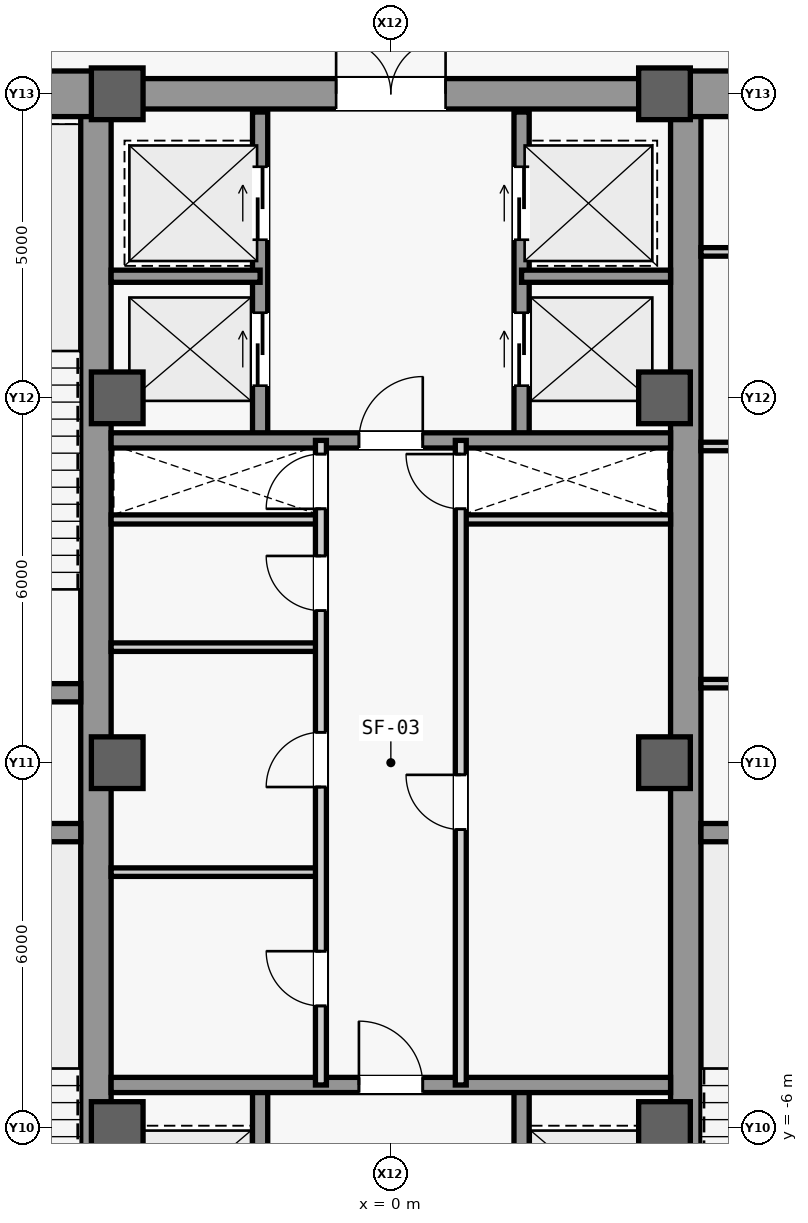
"""IFC4 building model, lengths in metres.
Left out: names, types, materials, properties, quantities, classifications, styles, units other than length and angle.
Written with IfcOpenShell. Run it as: python <this file> out.ifc"""

import sys

from ifc_helpers import new_model, si_unit, direction, frame, frame_2d, origin, origin_2d, place, context, subcontext, project, spatial, rectangle, extrude, source, transform, mapped, element, fill, save


model = new_model("IFC4")
c1 = context("Model", 3, precision=1e-05, world=origin(), true_north=direction((0.0, 1.0)))
c2 = subcontext(c1, "Body", "Model", "MODEL_VIEW")
j1 = project(units=[si_unit("LENGTHUNIT", "METRE"), si_unit("PLANEANGLEUNIT", "RADIAN")], contexts=[c1])
p1 = place(None, origin())
s1 = spatial("IfcSite", under=j1, at=p1, CompositionType="ELEMENT")
p2 = place(p1, origin())
s2 = spatial("IfcBuilding", under=s1, at=p2, CompositionType="ELEMENT")
p3 = place(p2, frame((0.0, 0.0, 144.7)))
s3 = spatial("IfcBuildingStorey", under=s2, at=p3, CompositionType="ELEMENT", Elevation=144.7)
m1 = source(origin(), c2, "Body", "SweptSolid", [
    extrude(rectangle(XDim=21.4, YDim=0.5, at=frame_2d((10.7, 0.0))), origin(), (0.0, 0.0, 1.0), 4.6),
])
for number, where, z_axis, x_axis in (
    (1, (-4.85, -10.7, 0.0), (0.0, 0.0, 1.0), (0.0, 1.0, 0.0)),
    (2, (4.85, -10.7, 0.0), (0.0, 0.0, 1.0), (0.0, 1.0, 0.0)),
):
    element("IfcWall", number, at=place(p3, frame(where, z_axis=z_axis, x_axis=x_axis)), inside=s3, PredefinedType="SHEAR", context=c2, shape_type="MappedRepresentation", body=[
        mapped(m1, transform((0.0, 0.0, 0.0), scale=1.0)),
    ])
m2 = source(origin(), c2, "Body", "SweptSolid", [
    extrude(rectangle(XDim=5.85, YDim=0.75, at=frame_2d((2.925, 0.0))), origin(), (0.0, 0.0, 1.0), 4.6),
])
p4 = place(p3, frame((-10.7, 11.0, 0.0), z_axis=(0.0, 0.0, 1.0), x_axis=(1.0, 0.0, 0.0)))
e3 = element("IfcWall", 3, at=p4, inside=s3, PredefinedType="SHEAR", context=c2, shape_type="MappedRepresentation", body=[
    mapped(m2, transform((0.0, 0.0, 0.0), scale=1.0)),
])
p5 = place(p3, frame((4.85, 11.0, 0.0), z_axis=(0.0, 0.0, 1.0), x_axis=(1.0, 0.0, 0.0)))
e4 = element("IfcWall", 4, at=p5, inside=s3, PredefinedType="SHEAR", context=c2, shape_type="MappedRepresentation", body=[
    mapped(m2, transform((0.0, 0.0, 0.0), scale=1.0)),
])
m3 = source(origin(), c2, "Body", "SweptSolid", [
    extrude(rectangle(XDim=1.05, YDim=2.2, at=frame_2d((0.525, 1.1))), frame((0.0, 0.385, 0.0), z_axis=(0.0, -1.0, 0.0), x_axis=(1.0, 0.0, 0.0)), (0.0, 0.0, 1.0), 0.77),
])
p6 = place(p5, frame((1.375, 0.0, 0.0)))
e5 = element("IfcOpeningElement", 5, at=p6, cuts=e4, PredefinedType="OPENING", context=c2, shape_type="MappedRepresentation", body=[
    mapped(m3, transform((0.0, 0.0, 0.0), scale=1.0)),
])
m4 = source(origin(), c2, "Body", "SweptSolid", [
    extrude(rectangle(XDim=5.6, YDim=0.3, at=frame_2d((2.8, 0.0))), origin(), (0.0, 0.0, 1.0), 4.6),
])
for number, where, z_axis, x_axis in (
    (6, (-10.7, -1.15, 0.0), (0.0, 0.0, 1.0), (1.0, 0.0, 0.0)),
    (7, (-10.7, 1.15, 0.0), (0.0, 0.0, 1.0), (1.0, 0.0, 0.0)),
    (8, (5.1, -1.15, 0.0), (0.0, 0.0, 1.0), (1.0, 0.0, 0.0)),
):
    element("IfcWall", number, at=place(p3, frame(where, z_axis=z_axis, x_axis=x_axis)), inside=s3, PredefinedType="SHEAR", context=c2, shape_type="MappedRepresentation", body=[
        mapped(m4, transform((0.0, 0.0, 0.0), scale=1.0)),
    ])
m5 = source(origin(), c2, "Body", "SweptSolid", [
    extrude(rectangle(XDim=9.2, YDim=0.5, at=frame_2d((4.6, 0.0))), origin(), (0.0, 0.0, 1.0), 4.6),
])
p7 = place(p3, frame((-4.6, 11.0, 0.0), z_axis=(0.0, 0.0, 1.0), x_axis=(1.0, 0.0, 0.0)))
e9 = element("IfcWall", 9, at=p7, inside=s3, PredefinedType="SHEAR", context=c2, shape_type="MappedRepresentation", body=[
    mapped(m5, transform((0.0, 0.0, 0.0), scale=1.0)),
])
m6 = source(origin(), c2, "Body", "SweptSolid", [
    extrude(rectangle(XDim=1.8, YDim=2.25, at=frame_2d((0.9, 1.125))), frame((0.0, 0.26, 0.0), z_axis=(0.0, -1.0, 0.0), x_axis=(1.0, 0.0, 0.0)), (0.0, 0.0, 1.0), 0.52),
])
p8 = place(p7, frame((3.7, 0.0, 0.0)))
e10 = element("IfcOpeningElement", 10, at=p8, cuts=e9, PredefinedType="OPENING", context=c2, shape_type="MappedRepresentation", body=[
    mapped(m6, transform((0.0, 0.0, 0.0), scale=1.0)),
])
m7 = source(origin(), c2, "Body", "SweptSolid", [
    extrude(rectangle(XDim=0.85, YDim=0.85, at=origin_2d()), origin(), (0.0, 0.0, 1.0), 5.2),
])
for number, where, z_axis, x_axis in (
    (11, (-4.5, -6.0, 0.0), (0.0, 0.0, 1.0), (1.0, 0.0, 0.0)),
    (12, (-4.5, 0.0, 0.0), (0.0, 0.0, 1.0), (1.0, 0.0, 0.0)),
    (13, (-4.5, 6.0, 0.0), (0.0, 0.0, 1.0), (1.0, 0.0, 0.0)),
    (14, (-4.5, 11.0, 0.0), (0.0, 0.0, 1.0), (1.0, 0.0, 0.0)),
    (15, (4.5, -6.0, 0.0), (0.0, 0.0, 1.0), (1.0, 0.0, 0.0)),
    (16, (4.5, 0.0, 0.0), (0.0, 0.0, 1.0), (1.0, 0.0, 0.0)),
    (17, (4.5, 6.0, 0.0), (0.0, 0.0, 1.0), (1.0, 0.0, 0.0)),
    (18, (4.5, 11.0, 0.0), (0.0, 0.0, 1.0), (1.0, 0.0, 0.0)),
):
    element("IfcColumn", number, at=place(p3, frame(where, z_axis=z_axis, x_axis=x_axis)), inside=s3, PredefinedType="COLUMN", context=c2, shape_type="MappedRepresentation", body=[
        mapped(m7, transform((0.0, 0.0, 0.0), scale=1.0)),
    ])
m8 = source(origin(), c2, "Body", "SweptSolid", [
    extrude(rectangle(XDim=3.15, YDim=0.14, at=frame_2d((1.575, 0.0))), origin(), (0.0, 0.0, 1.0), 4.6),
])
p9 = place(p3, frame((5.1, 1.3, 0.0), z_axis=(0.0, 0.0, 1.0), x_axis=(1.0, 0.0, 0.0)))
e19 = element("IfcWall", 19, at=p9, inside=s3, PredefinedType="PARTITIONING", context=c2, shape_type="MappedRepresentation", body=[
    mapped(m8, transform((0.0, 0.0, 0.0), scale=1.0)),
])
p10 = place(p3, frame((5.1, 8.4, 0.0), z_axis=(0.0, 0.0, 1.0), x_axis=(1.0, 0.0, 0.0)))
e20 = element("IfcWall", 20, at=p10, inside=s3, PredefinedType="PARTITIONING", context=c2, shape_type="MappedRepresentation", body=[
    mapped(m8, transform((0.0, 0.0, 0.0), scale=1.0)),
])
m9 = source(origin(), c2, "Body", "SweptSolid", [
    extrude(rectangle(XDim=0.9, YDim=2.15, at=frame_2d((0.45, 1.075))), frame((0.0, 0.08, 0.0), z_axis=(0.0, -1.0, 0.0), x_axis=(1.0, 0.0, 0.0)), (0.0, 0.0, 1.0), 0.16),
])
p11 = place(p10, frame((1.13, 0.0, 0.0)))
e21 = element("IfcOpeningElement", 21, at=p11, cuts=e20, PredefinedType="OPENING", context=c2, shape_type="MappedRepresentation", body=[
    mapped(m9, transform((0.0, 0.0, 0.0), scale=1.0)),
])
p12 = place(p3, frame((5.1, 5.2, 0.0), z_axis=(0.0, 0.0, 1.0), x_axis=(1.0, 0.0, 0.0)))
e22 = element("IfcWall", 22, at=p12, inside=s3, PredefinedType="PARTITIONING", context=c2, shape_type="MappedRepresentation", body=[
    mapped(m8, transform((0.0, 0.0, 0.0), scale=1.0)),
])
p13 = place(p12, frame((1.13, 0.0, 0.0)))
e23 = element("IfcOpeningElement", 23, at=p13, cuts=e22, PredefinedType="OPENING", context=c2, shape_type="MappedRepresentation", body=[
    mapped(m9, transform((0.0, 0.0, 0.0), scale=1.0)),
])
m10 = source(origin(), c2, "Body", "SweptSolid", [
    extrude(rectangle(XDim=3.45, YDim=0.15, at=frame_2d((1.725, 0.0))), origin(), (0.0, 0.0, 1.0), 4.6),
])
for number, where, z_axis, x_axis in (
    (24, (-4.6, 4.0, 0.0), (0.0, 0.0, 1.0), (1.0, 0.0, 0.0)),
    (25, (1.15, 4.0, 0.0), (0.0, 0.0, 1.0), (1.0, 0.0, 0.0)),
):
    element("IfcWall", number, at=place(p3, frame(where, z_axis=z_axis, x_axis=x_axis)), inside=s3, PredefinedType="PARTITIONING", context=c2, shape_type="MappedRepresentation", body=[
        mapped(m10, transform((0.0, 0.0, 0.0), scale=1.0)),
    ])
m11 = source(origin(), c2, "Body", "SweptSolid", [
    extrude(rectangle(XDim=5.4, YDim=0.25, at=frame_2d((2.7, 0.0))), origin(), (0.0, 0.0, 1.0), 4.6),
])
p14 = place(p3, frame((-2.15, -10.7, 0.0), z_axis=(0.0, 0.0, 1.0), x_axis=(0.0, 1.0, 0.0)))
e26 = element("IfcWall", 26, at=p14, inside=s3, PredefinedType="SHEAR", context=c2, shape_type="MappedRepresentation", body=[
    mapped(m11, transform((0.0, 0.0, 0.0), scale=1.0)),
])
m12 = source(origin(), c2, "Body", "SweptSolid", [
    extrude(rectangle(XDim=1.2, YDim=2.3, at=frame_2d((0.6, 1.15))), frame((0.0, 0.135, 0.0), z_axis=(0.0, -1.0, 0.0), x_axis=(1.0, 0.0, 0.0)), (0.0, 0.0, 1.0), 0.27),
])
p15 = place(p14, frame((0.9, 0.0, 0.0)))
e27 = element("IfcOpeningElement", 27, at=p15, cuts=e26, PredefinedType="OPENING", context=c2, shape_type="MappedRepresentation", body=[
    mapped(m12, transform((0.0, 0.0, 0.0), scale=1.0)),
])
p16 = place(p14, frame((3.2, 0.0, 0.0)))
e28 = element("IfcOpeningElement", 28, at=p16, cuts=e26, PredefinedType="OPENING", context=c2, shape_type="MappedRepresentation", body=[
    mapped(m12, transform((0.0, 0.0, 0.0), scale=1.0)),
])
p17 = place(p3, frame((2.15, -10.7, 0.0), z_axis=(0.0, 0.0, 1.0), x_axis=(0.0, 1.0, 0.0)))
e29 = element("IfcWall", 29, at=p17, inside=s3, PredefinedType="SHEAR", context=c2, shape_type="MappedRepresentation", body=[
    mapped(m11, transform((0.0, 0.0, 0.0), scale=1.0)),
])
p18 = place(p17, frame((0.9, 0.0, 0.0)))
e30 = element("IfcOpeningElement", 30, at=p18, cuts=e29, PredefinedType="OPENING", context=c2, shape_type="MappedRepresentation", body=[
    mapped(m12, transform((0.0, 0.0, 0.0), scale=1.0)),
])
p19 = place(p17, frame((3.2, 0.0, 0.0)))
e31 = element("IfcOpeningElement", 31, at=p19, cuts=e29, PredefinedType="OPENING", context=c2, shape_type="MappedRepresentation", body=[
    mapped(m12, transform((0.0, 0.0, 0.0), scale=1.0)),
])
m13 = source(origin(), c2, "Body", "SweptSolid", [
    extrude(rectangle(XDim=9.2, YDim=0.25, at=frame_2d((4.6, 0.0))), origin(), (0.0, 0.0, 1.0), 4.6),
])
p20 = place(p3, frame((-4.6, -5.3, 0.0), z_axis=(0.0, 0.0, 1.0), x_axis=(1.0, 0.0, 0.0)))
e32 = element("IfcWall", 32, at=p20, inside=s3, PredefinedType="SHEAR", context=c2, shape_type="MappedRepresentation", body=[
    mapped(m13, transform((0.0, 0.0, 0.0), scale=1.0)),
])
m14 = source(origin(), c2, "Body", "SweptSolid", [
    extrude(rectangle(XDim=1.05, YDim=2.2, at=frame_2d((0.525, 1.1))), frame((0.0, 0.135, 0.0), z_axis=(0.0, -1.0, 0.0), x_axis=(1.0, 0.0, 0.0)), (0.0, 0.0, 1.0), 0.27),
])
p21 = place(p20, frame((4.075, 0.0, 0.0)))
e33 = element("IfcOpeningElement", 33, at=p21, cuts=e32, PredefinedType="OPENING", context=c2, shape_type="MappedRepresentation", body=[
    mapped(m14, transform((0.0, 0.0, 0.0), scale=1.0)),
])
p22 = place(p3, frame((-2.15, 5.3, 0.0), z_axis=(0.0, 0.0, 1.0), x_axis=(0.0, 1.0, 0.0)))
e34 = element("IfcWall", 34, at=p22, inside=s3, PredefinedType="SHEAR", context=c2, shape_type="MappedRepresentation", body=[
    mapped(m11, transform((0.0, 0.0, 0.0), scale=1.0)),
])
p23 = place(p22, frame((3.3, 0.0, 0.0)))
e35 = element("IfcOpeningElement", 35, at=p23, cuts=e34, PredefinedType="OPENING", context=c2, shape_type="MappedRepresentation", body=[
    mapped(m12, transform((0.0, 0.0, 0.0), scale=1.0)),
])
p24 = place(p22, frame((0.9, 0.0, 0.0)))
e36 = element("IfcOpeningElement", 36, at=p24, cuts=e34, PredefinedType="OPENING", context=c2, shape_type="MappedRepresentation", body=[
    mapped(m12, transform((0.0, 0.0, 0.0), scale=1.0)),
])
p25 = place(p3, frame((2.15, 5.3, 0.0), z_axis=(0.0, 0.0, 1.0), x_axis=(0.0, 1.0, 0.0)))
e37 = element("IfcWall", 37, at=p25, inside=s3, PredefinedType="SHEAR", context=c2, shape_type="MappedRepresentation", body=[
    mapped(m11, transform((0.0, 0.0, 0.0), scale=1.0)),
])
p26 = place(p25, frame((3.3, 0.0, 0.0)))
e38 = element("IfcOpeningElement", 38, at=p26, cuts=e37, PredefinedType="OPENING", context=c2, shape_type="MappedRepresentation", body=[
    mapped(m12, transform((0.0, 0.0, 0.0), scale=1.0)),
])
p27 = place(p25, frame((0.9, 0.0, 0.0)))
e39 = element("IfcOpeningElement", 39, at=p27, cuts=e37, PredefinedType="OPENING", context=c2, shape_type="MappedRepresentation", body=[
    mapped(m12, transform((0.0, 0.0, 0.0), scale=1.0)),
])
m15 = source(origin(), c2, "Body", "SweptSolid", [
    extrude(rectangle(XDim=2.45, YDim=0.2, at=frame_2d((1.225, 0.0))), origin(), (0.0, 0.0, 1.0), 4.6),
])
for number, where, z_axis, x_axis in (
    (40, (-4.6, 8.0, 0.0), (0.0, 0.0, 1.0), (1.0, 0.0, 0.0)),
    (41, (2.15, 8.0, 0.0), (0.0, 0.0, 1.0), (1.0, 0.0, 0.0)),
):
    element("IfcWall", number, at=place(p3, frame(where, z_axis=z_axis, x_axis=x_axis)), inside=s3, PredefinedType="SHEAR", context=c2, shape_type="MappedRepresentation", body=[
        mapped(m15, transform((0.0, 0.0, 0.0), scale=1.0)),
    ])
p28 = place(p3, frame((-4.6, 5.3, 0.0), z_axis=(0.0, 0.0, 1.0), x_axis=(1.0, 0.0, 0.0)))
e42 = element("IfcWall", 42, at=p28, inside=s3, PredefinedType="SHEAR", context=c2, shape_type="MappedRepresentation", body=[
    mapped(m13, transform((0.0, 0.0, 0.0), scale=1.0)),
])
p29 = place(p28, frame((4.075, 0.0, 0.0)))
e43 = element("IfcOpeningElement", 43, at=p29, cuts=e42, PredefinedType="OPENING", context=c2, shape_type="MappedRepresentation", body=[
    mapped(m14, transform((0.0, 0.0, 0.0), scale=1.0)),
])
m16 = source(origin(), c2, "Body", "SweptSolid", [
    extrude(rectangle(XDim=3.45, YDim=0.14, at=frame_2d((1.725, 0.0))), origin(), (0.0, 0.0, 1.0), 4.6),
])
for number, where, z_axis, x_axis in (
    (44, (-4.6, -1.8, 0.0), (0.0, 0.0, 1.0), (1.0, 0.0, 0.0)),
    (45, (-4.6, 1.9, 0.0), (0.0, 0.0, 1.0), (1.0, 0.0, 0.0)),
):
    element("IfcWall", number, at=place(p3, frame(where, z_axis=z_axis, x_axis=x_axis)), inside=s3, PredefinedType="PARTITIONING", context=c2, shape_type="MappedRepresentation", body=[
        mapped(m16, transform((0.0, 0.0, 0.0), scale=1.0)),
    ])
m17 = source(origin(), c2, "Body", "SweptSolid", [
    extrude(rectangle(XDim=10.6, YDim=0.18, at=frame_2d((5.3, 0.0))), origin(), (0.0, 0.0, 1.0), 4.6),
])
p30 = place(p3, frame((-1.15, -5.3, 0.0), z_axis=(0.0, 0.0, 1.0), x_axis=(0.0, 1.0, 0.0)))
e46 = element("IfcWall", 46, at=p30, inside=s3, PredefinedType="PARTITIONING", context=c2, shape_type="MappedRepresentation", body=[
    mapped(m17, transform((0.0, 0.0, 0.0), scale=1.0)),
])
m18 = source(origin(), c2, "Body", "SweptSolid", [
    extrude(rectangle(XDim=0.9, YDim=2.15, at=frame_2d((0.45, 1.075))), frame((0.0, 0.1, 0.0), z_axis=(0.0, -1.0, 0.0), x_axis=(1.0, 0.0, 0.0)), (0.0, 0.0, 1.0), 0.2),
])
p31 = place(p30, frame((1.3, 0.0, 0.0)))
e47 = element("IfcOpeningElement", 47, at=p31, cuts=e46, PredefinedType="OPENING", context=c2, shape_type="MappedRepresentation", body=[
    mapped(m18, transform((0.0, 0.0, 0.0), scale=1.0)),
])
p32 = place(p30, frame((4.9, 0.0, 0.0)))
e48 = element("IfcOpeningElement", 48, at=p32, cuts=e46, PredefinedType="OPENING", context=c2, shape_type="MappedRepresentation", body=[
    mapped(m18, transform((0.0, 0.0, 0.0), scale=1.0)),
])
p33 = place(p30, frame((7.8, 0.0, 0.0)))
e49 = element("IfcOpeningElement", 49, at=p33, cuts=e46, PredefinedType="OPENING", context=c2, shape_type="MappedRepresentation", body=[
    mapped(m18, transform((0.0, 0.0, 0.0), scale=1.0)),
])
p34 = place(p30, frame((9.475, 0.0, 0.0)))
e50 = element("IfcOpeningElement", 50, at=p34, cuts=e46, PredefinedType="OPENING", context=c2, shape_type="MappedRepresentation", body=[
    mapped(m18, transform((0.0, 0.0, 0.0), scale=1.0)),
])
p35 = place(p3, frame((1.15, -5.3, 0.0), z_axis=(0.0, 0.0, 1.0), x_axis=(0.0, 1.0, 0.0)))
e51 = element("IfcWall", 51, at=p35, inside=s3, PredefinedType="PARTITIONING", context=c2, shape_type="MappedRepresentation", body=[
    mapped(m17, transform((0.0, 0.0, 0.0), scale=1.0)),
])
p36 = place(p35, frame((4.2, 0.0, 0.0)))
e52 = element("IfcOpeningElement", 52, at=p36, cuts=e51, PredefinedType="OPENING", context=c2, shape_type="MappedRepresentation", body=[
    mapped(m18, transform((0.0, 0.0, 0.0), scale=1.0)),
])
p37 = place(p35, frame((9.475, 0.0, 0.0)))
e53 = element("IfcOpeningElement", 53, at=p37, cuts=e51, PredefinedType="OPENING", context=c2, shape_type="MappedRepresentation", body=[
    mapped(m18, transform((0.0, 0.0, 0.0), scale=1.0)),
])
m19 = source(origin(), c2, "Body", "SweptSolid", [
    extrude(rectangle(XDim=1.05, YDim=2.2, at=frame_2d((0.525, 1.1))), frame((0.0, 0.025, 0.0), z_axis=(0.0, -1.0, 0.0), x_axis=(1.0, 0.0, 0.0)), (0.0, 0.0, 1.0), 0.05),
])
p38 = place(p21, origin())
e54 = element("IfcDoor", 54, at=p38, inside=s3, OperationType="SINGLE_SWING_LEFT", PredefinedType="DOOR", context=c2, shape_type="MappedRepresentation", body=[
    mapped(m19, transform((0.0, 0.0, 0.0), scale=1.0)),
])
fill(e33, e54)
p39 = place(p29, origin())
e55 = element("IfcDoor", 55, at=p39, inside=s3, OperationType="SINGLE_SWING_RIGHT", PredefinedType="DOOR", context=c2, shape_type="MappedRepresentation", body=[
    mapped(m19, transform((0.0, 0.0, 0.0), scale=1.0)),
])
fill(e43, e55)
m20 = source(origin(), c2, "Body", "SweptSolid", [
    extrude(rectangle(XDim=1.8, YDim=2.25, at=frame_2d((0.9, 1.125))), frame((0.0, 0.025, 0.0), z_axis=(0.0, -1.0, 0.0), x_axis=(1.0, 0.0, 0.0)), (0.0, 0.0, 1.0), 0.05),
])
p40 = place(p8, origin())
e56 = element("IfcDoor", 56, at=p40, inside=s3, OperationType="SINGLE_SWING_RIGHT", PredefinedType="DOOR", context=c2, shape_type="MappedRepresentation", body=[
    mapped(m20, transform((0.0, 0.0, 0.0), scale=1.0)),
])
fill(e10, e56)
m21 = source(origin(), c2, "Body", "SweptSolid", [
    extrude(rectangle(XDim=0.9, YDim=2.15, at=frame_2d((0.45, 1.075))), frame((0.0, 0.025, 0.0), z_axis=(0.0, -1.0, 0.0), x_axis=(1.0, 0.0, 0.0)), (0.0, 0.0, 1.0), 0.05),
])
p41 = place(p31, origin())
e57 = element("IfcDoor", 57, at=p41, inside=s3, OperationType="SINGLE_SWING_RIGHT", PredefinedType="DOOR", context=c2, shape_type="MappedRepresentation", body=[
    mapped(m21, transform((0.0, 0.0, 0.0), scale=1.0)),
])
fill(e47, e57)
p42 = place(p32, origin())
e58 = element("IfcDoor", 58, at=p42, inside=s3, OperationType="SINGLE_SWING_LEFT", PredefinedType="DOOR", context=c2, shape_type="MappedRepresentation", body=[
    mapped(m21, transform((0.0, 0.0, 0.0), scale=1.0)),
])
fill(e48, e58)
p43 = place(p33, origin())
e59 = element("IfcDoor", 59, at=p43, inside=s3, OperationType="SINGLE_SWING_RIGHT", PredefinedType="DOOR", context=c2, shape_type="MappedRepresentation", body=[
    mapped(m21, transform((0.0, 0.0, 0.0), scale=1.0)),
])
fill(e49, e59)
p44 = place(p36, origin())
e60 = element("IfcDoor", 60, at=p44, inside=s3, OperationType="SINGLE_SWING_RIGHT", PredefinedType="DOOR", context=c2, shape_type="MappedRepresentation", body=[
    mapped(m21, transform((0.0, 0.0, 0.0), scale=1.0)),
])
fill(e52, e60)
p45 = place(p34, origin())
e61 = element("IfcDoor", 61, at=p45, inside=s3, OperationType="SINGLE_SWING_LEFT", PredefinedType="DOOR", context=c2, shape_type="MappedRepresentation", body=[
    mapped(m21, transform((0.0, 0.0, 0.0), scale=1.0)),
])
fill(e50, e61)
p46 = place(p37, origin())
e62 = element("IfcDoor", 62, at=p46, inside=s3, OperationType="SINGLE_SWING_RIGHT", PredefinedType="DOOR", context=c2, shape_type="MappedRepresentation", body=[
    mapped(m21, transform((0.0, 0.0, 0.0), scale=1.0)),
])
fill(e53, e62)
m22 = source(origin(), c2, "Body", "SweptSolid", [
    extrude(rectangle(XDim=1.2, YDim=2.3, at=frame_2d((0.6, 1.15))), frame((0.0, 0.025, 0.0), z_axis=(0.0, -1.0, 0.0), x_axis=(1.0, 0.0, 0.0)), (0.0, 0.0, 1.0), 0.05),
])
p47 = place(p23, origin())
e63 = element("IfcDoor", 63, at=p47, inside=s3, OperationType="SLIDING_TO_LEFT", PredefinedType="DOOR", context=c2, shape_type="MappedRepresentation", body=[
    mapped(m22, transform((0.0, 0.0, 0.0), scale=1.0)),
])
fill(e35, e63)
p48 = place(p26, origin())
e64 = element("IfcDoor", 64, at=p48, inside=s3, OperationType="SLIDING_TO_LEFT", PredefinedType="DOOR", context=c2, shape_type="MappedRepresentation", body=[
    mapped(m22, transform((0.0, 0.0, 0.0), scale=1.0)),
])
fill(e38, e64)
p49 = place(p24, origin())
e65 = element("IfcDoor", 65, at=p49, inside=s3, OperationType="SLIDING_TO_LEFT", PredefinedType="DOOR", context=c2, shape_type="MappedRepresentation", body=[
    mapped(m22, transform((0.0, 0.0, 0.0), scale=1.0)),
])
fill(e36, e65)
p50 = place(p27, origin())
e66 = element("IfcDoor", 66, at=p50, inside=s3, OperationType="SLIDING_TO_LEFT", PredefinedType="DOOR", context=c2, shape_type="MappedRepresentation", body=[
    mapped(m22, transform((0.0, 0.0, 0.0), scale=1.0)),
])
fill(e39, e66)
save(model, sys.argv[1])
